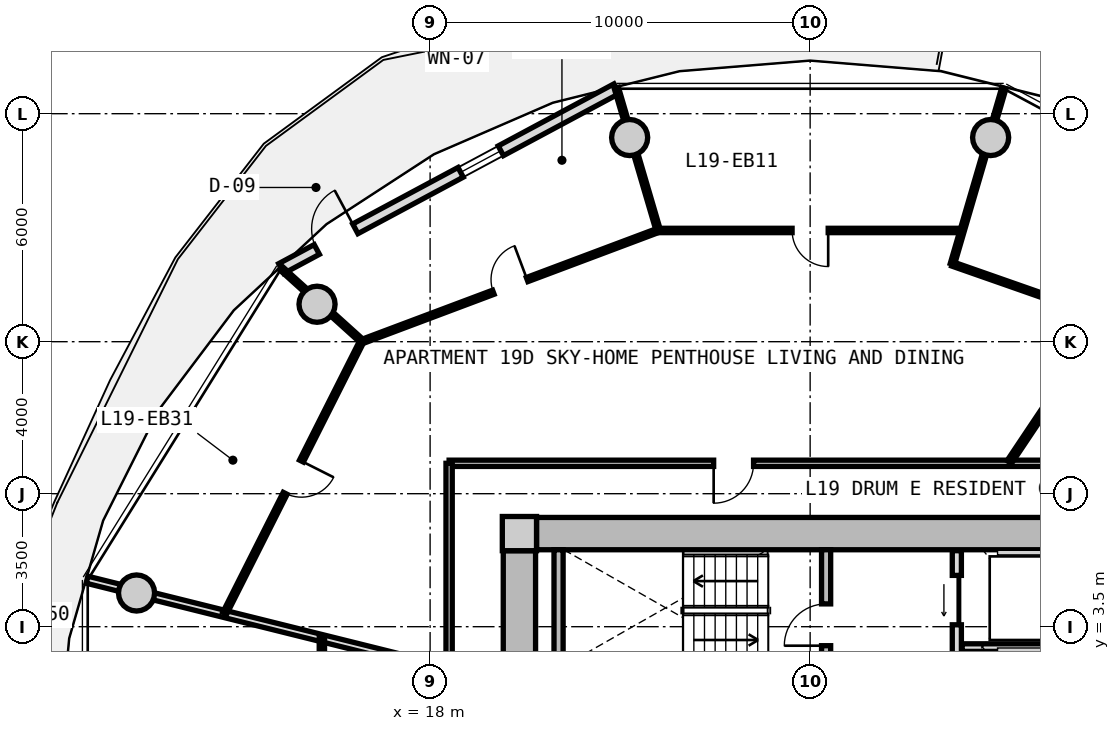
"""IFC4 building model, lengths in metres.
Left out: names, types, materials, properties, quantities, classifications, styles, units other than length and angle.
Written with IfcOpenShell. Run it as: python <this file> out.ifc"""

import sys

from ifc_helpers import new_model, si_unit, direction, frame, frame_2d, origin, origin_2d, place, context, subcontext, project, spatial, rectangle, circle, extrude, source, transform, mapped, element, fill, save


model = new_model("IFC4")
c1 = context("Model", 3, precision=1e-05, world=origin(), true_north=direction((0.0, 1.0)))
c2 = subcontext(c1, "Body", "Model", "MODEL_VIEW")
j1 = project(units=[si_unit("LENGTHUNIT", "METRE"), si_unit("PLANEANGLEUNIT", "RADIAN")], contexts=[c1])
p1 = place(None, origin())
s1 = spatial("IfcSite", under=j1, at=p1, CompositionType="ELEMENT")
p2 = place(p1, origin())
s2 = spatial("IfcBuilding", under=s1, at=p2, CompositionType="ELEMENT")
p3 = place(p2, frame((0.0, 0.0, 64.3)))
s3 = spatial("IfcBuildingStorey", under=s2, at=p3, CompositionType="ELEMENT", Elevation=64.3)
m1 = source(origin(), c2, "Body", "SweptSolid", [
    extrude(rectangle(XDim=0.9, YDim=0.9, at=origin_2d()), origin(), (0.0, 0.0, 1.0), 3.05),
])
p4 = place(p3, frame((20.35, 5.95, 0.0), z_axis=(0.0, 0.0, 1.0), x_axis=(1.0, 0.0, 0.0)))
e1 = element("IfcColumn", 1, at=p4, inside=s3, PredefinedType="COLUMN", context=c2, shape_type="MappedRepresentation", body=[
    mapped(m1, transform((0.0, 0.0, 0.0), x_axis=(1.0, 0.0, 0.0), y_axis=(0.0, 1.0, 0.0), z_axis=(0.0, 0.0, 1.0), scale=1.0)),
])
m2 = source(origin(), c2, "Body", "SweptSolid", [
    extrude(rectangle(XDim=14.4, YDim=0.85, at=frame_2d((7.2, 0.0))), origin(), (0.0, 0.0, 1.0), 2.79),
])
p5 = place(p3, frame((20.8, 5.95, 0.0), z_axis=(0.0, 0.0, 1.0), x_axis=(1.0, 0.0, 0.0)))
e2 = element("IfcWall", 2, at=p5, inside=s3, PredefinedType="SHEAR", context=c2, shape_type="MappedRepresentation", body=[
    mapped(m2, transform((0.0, 0.0, 0.0), x_axis=(1.0, 0.0, 0.0), y_axis=(0.0, 1.0, 0.0), z_axis=(0.0, 0.0, 1.0), scale=1.0)),
])
m3 = source(origin(), c2, "Body", "SweptSolid", [
    extrude(rectangle(XDim=11.0, YDim=0.85, at=frame_2d((5.5, 0.0))), origin(), (0.0, 0.0, 1.0), 2.79),
])
p6 = place(p3, frame((20.35, -5.5, 0.0), z_axis=(0.0, 0.0, 1.0), x_axis=(0.0, 1.0, 0.0)))
e3 = element("IfcWall", 3, at=p6, inside=s3, PredefinedType="SHEAR", context=c2, shape_type="MappedRepresentation", body=[
    mapped(m3, transform((0.0, 0.0, 0.0), x_axis=(1.0, 0.0, 0.0), y_axis=(0.0, 1.0, 0.0), z_axis=(0.0, 0.0, 1.0), scale=1.0)),
])
p7 = place(p6, frame((3.8, 0.0, 0.0)))
e4 = element("IfcOpeningElement", 4, at=p7, cuts=e3, PredefinedType="OPENING", context=c2, shape_type="SweptSolid", body=[
    extrude(rectangle(XDim=1.2, YDim=2.15, at=frame_2d((0.6, 1.075))), frame((0.0, 0.435, 0.0), z_axis=(0.0, -1.0, 0.0), x_axis=(1.0, 0.0, 0.0)), (0.0, 0.0, 1.0), 0.87),
])
m4 = source(origin(), c2, "Body", "SweptSolid", [
    extrude(circle(Radius=0.475, at=origin_2d()), origin(), (0.0, 0.0, 1.0), 3.05),
])
for number, where, z_axis, x_axis in (
    (5, (32.749, 16.373, 0.0), (0.0, 0.0, 1.0), (1.0, 0.0, 0.0)),
    (6, (23.251, 16.373, 0.0), (0.0, 0.0, 1.0), (1.0, 0.0, 0.0)),
    (7, (15.025, 11.985, 0.0), (0.0, 0.0, 1.0), (1.0, 0.0, 0.0)),
    (8, (10.275, 4.387, 0.0), (0.0, 0.0, 1.0), (1.0, 0.0, 0.0)),
):
    element("IfcColumn", number, at=place(p3, frame(where, z_axis=z_axis, x_axis=x_axis)), inside=s3, PredefinedType="COLUMN", context=c2, shape_type="MappedRepresentation", body=[
        mapped(m4, transform((0.0, 0.0, 0.0), x_axis=(1.0, 0.0, 0.0), y_axis=(0.0, 1.0, 0.0), z_axis=(0.0, 0.0, 1.0), scale=1.0)),
    ])
m5 = source(origin(), c2, "Body", "SweptSolid", [
    extrude(rectangle(XDim=10.011, YDim=0.29, at=frame_2d((5.005, 0.0))), origin(), (0.0, 0.0, 1.0), 2.79),
])
p8 = place(p3, frame((14.084, 12.926, 0.0), z_axis=(0.0, 0.0, 1.0), x_axis=(0.881272505317, 0.472608475773, 0.0)))
e9 = element("IfcWall", 9, at=p8, inside=s3, PredefinedType="SOLIDWALL", context=c2, shape_type="MappedRepresentation", body=[
    mapped(m5, transform((0.0, 0.0, 0.0), x_axis=(1.0, 0.0, 0.0), y_axis=(0.0, 1.0, 0.0), z_axis=(0.0, 0.0, 1.0), scale=1.0)),
])
p9 = place(p8, frame((1.06, 0.0, 0.0)))
e10 = element("IfcOpeningElement", 10, at=p9, cuts=e9, PredefinedType="OPENING", context=c2, shape_type="SweptSolid", body=[
    extrude(rectangle(XDim=1.15, YDim=2.25, at=frame_2d((0.575, 1.125))), frame((0.0, 0.155, 0.0), z_axis=(0.0, -1.0, 0.0), x_axis=(1.0, 0.0, 0.0)), (0.0, 0.0, 1.0), 0.31),
])
p10 = place(p8, frame((5.355, 0.0, 0.85)))
e11 = element("IfcOpeningElement", 11, at=p10, cuts=e9, PredefinedType="OPENING", context=c2, shape_type="SweptSolid", body=[
    extrude(rectangle(XDim=1.2, YDim=1.5, at=frame_2d((0.6, 0.75))), frame((0.0, 0.155, 0.0), z_axis=(0.0, -1.0, 0.0), x_axis=(1.0, 0.0, 0.0)), (0.0, 0.0, 1.0), 0.31),
])
m6 = source(origin(), c2, "Body", "SweptSolid", [
    extrude(rectangle(XDim=3.075, YDim=0.24, at=frame_2d((1.538, 0.0))), origin(), (0.0, 0.0, 1.0), 2.79),
])
p11 = place(p3, frame((21.38, 2.45, 0.0), z_axis=(0.0, 0.0, 1.0), x_axis=(0.0, 1.0, 0.0)))
e12 = element("IfcWall", 12, at=p11, inside=s3, PredefinedType="PARTITIONING", context=c2, shape_type="MappedRepresentation", body=[
    mapped(m6, transform((0.0, 0.0, 0.0), x_axis=(1.0, 0.0, 0.0), y_axis=(0.0, 1.0, 0.0), z_axis=(0.0, 0.0, 1.0), scale=1.0)),
])
p12 = place(p3, frame((28.42, 2.45, 0.0), z_axis=(0.0, 0.0, 1.0), x_axis=(0.0, 1.0, 0.0)))
e13 = element("IfcWall", 13, at=p12, inside=s3, PredefinedType="PARTITIONING", context=c2, shape_type="MappedRepresentation", body=[
    mapped(m6, transform((0.0, 0.0, 0.0), x_axis=(1.0, 0.0, 0.0), y_axis=(0.0, 1.0, 0.0), z_axis=(0.0, 0.0, 1.0), scale=1.0)),
])
p13 = place(p12, frame((0.55, 0.0, 0.0)))
e14 = element("IfcOpeningElement", 14, at=p13, cuts=e13, PredefinedType="OPENING", context=c2, shape_type="SweptSolid", body=[
    extrude(rectangle(XDim=1.1, YDim=2.15, at=frame_2d((0.55, 1.075))), frame((0.0, 0.13, 0.0), z_axis=(0.0, -1.0, 0.0), x_axis=(1.0, 0.0, 0.0)), (0.0, 0.0, 1.0), 0.26),
])
m7 = source(origin(), c2, "Body", "SweptSolid", [
    extrude(rectangle(XDim=5.0, YDim=0.24, at=frame_2d((2.5, 0.0))), origin(), (0.0, 0.0, 1.0), 2.775),
])
p14 = place(p3, frame((31.86, 0.5, 0.0), z_axis=(0.0, 0.0, 1.0), x_axis=(0.0, 1.0, 0.0)))
e15 = element("IfcWall", 15, at=p14, inside=s3, PredefinedType="PARTITIONING", context=c2, shape_type="MappedRepresentation", body=[
    mapped(m7, transform((0.0, 0.0, 0.0), x_axis=(1.0, 0.0, 0.0), y_axis=(0.0, 1.0, 0.0), z_axis=(0.0, 0.0, 1.0), scale=1.0)),
])
p15 = place(p14, frame((3.05, 0.0, 0.0)))
e16 = element("IfcOpeningElement", 16, at=p15, cuts=e15, PredefinedType="OPENING", context=c2, shape_type="SweptSolid", body=[
    extrude(rectangle(XDim=1.3, YDim=2.2, at=frame_2d((0.65, 1.1))), frame((0.0, 0.13, 0.0), z_axis=(0.0, -1.0, 0.0), x_axis=(1.0, 0.0, 0.0)), (0.0, 0.0, 1.0), 0.26),
])
p16 = place(p14, frame((0.55, 0.0, 0.0)))
e17 = element("IfcOpeningElement", 17, at=p16, cuts=e15, PredefinedType="OPENING", context=c2, shape_type="SweptSolid", body=[
    extrude(rectangle(XDim=1.3, YDim=2.2, at=frame_2d((0.65, 1.1))), frame((0.0, 0.13, 0.0), z_axis=(0.0, -1.0, 0.0), x_axis=(1.0, 0.0, 0.0)), (0.0, 0.0, 1.0), 0.26),
])
m8 = source(origin(), c2, "Body", "SweptSolid", [
    extrude(rectangle(XDim=3.2, YDim=0.2, at=frame_2d((1.6, 0.0))), origin(), (0.0, 0.0, 1.0), 2.775),
])
p17 = place(p3, frame((32.0, 2.95, 0.0), z_axis=(0.0, 0.0, 1.0), x_axis=(1.0, 0.0, 0.0)))
e18 = element("IfcWall", 18, at=p17, inside=s3, PredefinedType="PARTITIONING", context=c2, shape_type="MappedRepresentation", body=[
    mapped(m8, transform((0.0, 0.0, 0.0), x_axis=(1.0, 0.0, 0.0), y_axis=(0.0, 1.0, 0.0), z_axis=(0.0, 0.0, 1.0), scale=1.0)),
])
m9 = source(origin(), c2, "Body", "SweptSolid", [
    extrude(rectangle(XDim=19.0, YDim=0.165, at=frame_2d((9.5, 0.0))), origin(), (0.0, 0.0, 1.0), 2.775),
])
p18 = place(p3, frame((18.5, 7.8, 0.0), z_axis=(0.0, 0.0, 1.0), x_axis=(1.0, 0.0, 0.0)))
e19 = element("IfcWall", 19, at=p18, inside=s3, PredefinedType="PARTITIONING", context=c2, shape_type="MappedRepresentation", body=[
    mapped(m9, transform((0.0, 0.0, 0.0), x_axis=(1.0, 0.0, 0.0), y_axis=(0.0, 1.0, 0.0), z_axis=(0.0, 0.0, 1.0), scale=1.0)),
])
p19 = place(p18, frame((6.961, 0.0, 0.0)))
e20 = element("IfcOpeningElement", 20, at=p19, cuts=e19, PredefinedType="OPENING", context=c2, shape_type="SweptSolid", body=[
    extrude(rectangle(XDim=1.05, YDim=2.15, at=frame_2d((0.525, 1.075))), frame((0.0, 0.093, 0.0), z_axis=(0.0, -1.0, 0.0), x_axis=(1.0, 0.0, 0.0)), (0.0, 0.0, 1.0), 0.185),
])
m10 = source(origin(), c2, "Body", "SweptSolid", [
    extrude(rectangle(XDim=15.6, YDim=0.165, at=frame_2d((7.8, 0.0))), origin(), (0.0, 0.0, 1.0), 2.775),
])
p20 = place(p3, frame((18.5, -7.8, 0.0), z_axis=(0.0, 0.0, 1.0), x_axis=(0.0, 1.0, 0.0)))
e21 = element("IfcWall", 21, at=p20, inside=s3, PredefinedType="PARTITIONING", context=c2, shape_type="MappedRepresentation", body=[
    mapped(m10, transform((0.0, 0.0, 0.0), x_axis=(1.0, 0.0, 0.0), y_axis=(0.0, 1.0, 0.0), z_axis=(0.0, 0.0, 1.0), scale=1.0)),
])
p21 = place(p20, frame((3.63, 0.0, 0.0)))
e22 = element("IfcOpeningElement", 22, at=p21, cuts=e21, PredefinedType="OPENING", context=c2, shape_type="SweptSolid", body=[
    extrude(rectangle(XDim=1.05, YDim=2.15, at=frame_2d((0.525, 1.075))), frame((0.0, 0.093, 0.0), z_axis=(0.0, -1.0, 0.0), x_axis=(1.0, 0.0, 0.0)), (0.0, 0.0, 1.0), 0.185),
])
m11 = source(origin(), c2, "Body", "SweptSolid", [
    extrude(rectangle(XDim=9.737, YDim=0.19, at=frame_2d((4.869, 0.0))), origin(), (0.0, 0.0, 1.0), 2.225),
])
p22 = place(p3, frame((18.42, 2.385, 0.0), z_axis=(0.0, 0.0, 1.0), x_axis=(-0.970392716238, 0.241532557375, 0.0)))
e23 = element("IfcWall", 23, at=p22, inside=s3, PredefinedType="PARTITIONING", context=c2, shape_type="MappedRepresentation", body=[
    mapped(m11, transform((0.0, 0.0, 0.0), x_axis=(1.0, 0.0, 0.0), y_axis=(0.0, 1.0, 0.0), z_axis=(0.0, 0.0, 1.0), scale=1.0)),
])
m12 = source(origin(), c2, "Body", "SweptSolid", [
    extrude(rectangle(XDim=2.795, YDim=0.14, at=frame_2d((1.397, 0.0))), origin(), (0.0, 0.0, 1.0), 2.775),
])
p23 = place(p3, frame((15.148, 0.419, 0.0), z_axis=(0.0, 0.0, 1.0), x_axis=(0.001659531299, 0.999998622977, 0.0)))
e24 = element("IfcWall", 24, at=p23, inside=s3, PredefinedType="PARTITIONING", context=c2, shape_type="MappedRepresentation", body=[
    mapped(m12, transform((0.0, 0.0, 0.0), x_axis=(1.0, 0.0, 0.0), y_axis=(0.0, 1.0, 0.0), z_axis=(0.0, 0.0, 1.0), scale=1.0)),
])
m13 = source(origin(), c2, "Body", "SweptSolid", [
    extrude(rectangle(XDim=7.993, YDim=0.115, at=frame_2d((3.996, 0.0))), origin(), (0.0, 0.0, 1.0), 2.775),
])
p24 = place(p3, frame((31.996, 13.927, 0.0), z_axis=(0.0, 0.0, 1.0), x_axis=(-1.0, 0.0, 0.0)))
e25 = element("IfcWall", 25, at=p24, inside=s3, PredefinedType="PARTITIONING", context=c2, shape_type="MappedRepresentation", body=[
    mapped(m13, transform((0.0, 0.0, 0.0), x_axis=(1.0, 0.0, 0.0), y_axis=(0.0, 1.0, 0.0), z_axis=(0.0, 0.0, 1.0), scale=1.0)),
])
p25 = place(p24, frame((3.521, 0.0, 0.0)))
e26 = element("IfcOpeningElement", 26, at=p25, cuts=e25, PredefinedType="OPENING", context=c2, shape_type="SweptSolid", body=[
    extrude(rectangle(XDim=0.95, YDim=2.1, at=frame_2d((0.475, 1.05))), frame((0.0, 0.067, 0.0), z_axis=(0.0, -1.0, 0.0), x_axis=(1.0, 0.0, 0.0)), (0.0, 0.0, 1.0), 0.135),
])
m14 = source(origin(), c2, "Body", "SweptSolid", [
    extrude(rectangle(XDim=4.829, YDim=0.115, at=frame_2d((2.415, 0.0))), origin(), (0.0, 0.0, 1.0), 2.225),
])
p26 = place(p3, frame((31.742, 13.042, 0.0), z_axis=(0.0, 0.0, 1.0), x_axis=(0.280838556456, 0.959755023539, 0.0)))
e27 = element("IfcWall", 27, at=p26, inside=s3, PredefinedType="PARTITIONING", context=c2, shape_type="MappedRepresentation", body=[
    mapped(m14, transform((0.0, 0.0, 0.0), x_axis=(1.0, 0.0, 0.0), y_axis=(0.0, 1.0, 0.0), z_axis=(0.0, 0.0, 1.0), scale=1.0)),
])
m15 = source(origin(), c2, "Body", "SweptSolid", [
    extrude(rectangle(XDim=8.32, YDim=0.115, at=frame_2d((4.16, 0.0))), origin(), (0.0, 0.0, 1.0), 2.775),
])
p27 = place(p3, frame((24.003, 13.93, 0.0), z_axis=(0.0, 0.0, 1.0), x_axis=(-0.936180763098, -0.351518959382, 0.0)))
e28 = element("IfcWall", 28, at=p27, inside=s3, PredefinedType="PARTITIONING", context=c2, shape_type="MappedRepresentation", body=[
    mapped(m15, transform((0.0, 0.0, 0.0), x_axis=(1.0, 0.0, 0.0), y_axis=(0.0, 1.0, 0.0), z_axis=(0.0, 0.0, 1.0), scale=1.0)),
])
p28 = place(p27, frame((3.685, 0.0, 0.0)))
e29 = element("IfcOpeningElement", 29, at=p28, cuts=e28, PredefinedType="OPENING", context=c2, shape_type="SweptSolid", body=[
    extrude(rectangle(XDim=0.95, YDim=2.1, at=frame_2d((0.475, 1.05))), frame((0.0, 0.067, 0.0), z_axis=(0.0, -1.0, 0.0), x_axis=(1.0, 0.0, 0.0)), (0.0, 0.0, 1.0), 0.135),
])
m16 = source(origin(), c2, "Body", "SweptSolid", [
    extrude(rectangle(XDim=3.905, YDim=0.115, at=frame_2d((1.952, 0.0))), origin(), (0.0, 0.0, 1.0), 2.225),
])
p29 = place(p3, frame((24.003, 13.93, 0.0), z_axis=(0.0, 0.0, 1.0), x_axis=(-0.282037692958, 0.959403324859, 0.0)))
e30 = element("IfcWall", 30, at=p29, inside=s3, PredefinedType="PARTITIONING", context=c2, shape_type="MappedRepresentation", body=[
    mapped(m16, transform((0.0, 0.0, 0.0), x_axis=(1.0, 0.0, 0.0), y_axis=(0.0, 1.0, 0.0), z_axis=(0.0, 0.0, 1.0), scale=1.0)),
])
m17 = source(origin(), c2, "Body", "SweptSolid", [
    extrude(rectangle(XDim=8.018, YDim=0.115, at=frame_2d((4.009, 0.0))), origin(), (0.0, 0.0, 1.0), 2.775),
])
p30 = place(p3, frame((16.205, 11.014, 0.0), z_axis=(0.0, 0.0, 1.0), x_axis=(-0.450134355233, -0.89296084026, 0.0)))
e31 = element("IfcWall", 31, at=p30, inside=s3, PredefinedType="PARTITIONING", context=c2, shape_type="MappedRepresentation", body=[
    mapped(m17, transform((0.0, 0.0, 0.0), x_axis=(1.0, 0.0, 0.0), y_axis=(0.0, 1.0, 0.0), z_axis=(0.0, 0.0, 1.0), scale=1.0)),
])
p31 = place(p30, frame((3.534, 0.0, 0.0)))
e32 = element("IfcOpeningElement", 32, at=p31, cuts=e31, PredefinedType="OPENING", context=c2, shape_type="SweptSolid", body=[
    extrude(rectangle(XDim=0.95, YDim=2.1, at=frame_2d((0.475, 1.05))), frame((0.0, 0.067, 0.0), z_axis=(0.0, -1.0, 0.0), x_axis=(1.0, 0.0, 0.0)), (0.0, 0.0, 1.0), 0.135),
])
m18 = source(origin(), c2, "Body", "SweptSolid", [
    extrude(rectangle(XDim=2.875, YDim=0.115, at=frame_2d((1.438, 0.0))), origin(), (0.0, 0.0, 1.0), 2.225),
])
p32 = place(p3, frame((16.205, 11.014, 0.0), z_axis=(0.0, 0.0, 1.0), x_axis=(-0.742512588127, 0.669832110661, 0.0)))
e33 = element("IfcWall", 33, at=p32, inside=s3, PredefinedType="PARTITIONING", context=c2, shape_type="MappedRepresentation", body=[
    mapped(m18, transform((0.0, 0.0, 0.0), x_axis=(1.0, 0.0, 0.0), y_axis=(0.0, 1.0, 0.0), z_axis=(0.0, 0.0, 1.0), scale=1.0)),
])
m19 = source(origin(), c2, "Body", "SweptSolid", [
    extrude(rectangle(XDim=3.025, YDim=0.14, at=frame_2d((1.513, 0.0))), origin(), (0.0, 0.0, 1.0), 2.775),
])
p33 = place(p3, frame((33.24, 7.83, 0.0), z_axis=(0.0, 0.0, 1.0), x_axis=(0.556189165904, 0.831055721195, 0.0)))
e34 = element("IfcWall", 34, at=p33, inside=s3, PredefinedType="PARTITIONING", context=c2, shape_type="MappedRepresentation", body=[
    mapped(m19, transform((0.0, 0.0, 0.0), x_axis=(1.0, 0.0, 0.0), y_axis=(0.0, 1.0, 0.0), z_axis=(0.0, 0.0, 1.0), scale=1.0)),
])
m20 = source(origin(), c2, "Body", "SweptSolid", [
    extrude(rectangle(XDim=3.765, YDim=0.115, at=frame_2d((1.882, 0.0))), origin(), (0.0, 0.0, 1.0), 2.775),
])
p34 = place(p3, frame((35.296, 11.801, 0.0), z_axis=(0.0, 0.0, 1.0), x_axis=(-0.943788572669, 0.330549739222, 0.0)))
e35 = element("IfcWall", 35, at=p34, inside=s3, PredefinedType="PARTITIONING", context=c2, shape_type="MappedRepresentation", body=[
    mapped(m20, transform((0.0, 0.0, 0.0), x_axis=(1.0, 0.0, 0.0), y_axis=(0.0, 1.0, 0.0), z_axis=(0.0, 0.0, 1.0), scale=1.0)),
])
m21 = source(origin(), c2, "Body", "SweptSolid", [
    extrude(rectangle(XDim=1.15, YDim=2.25, at=frame_2d((0.575, 1.125))), frame((0.0, 0.025, 0.0), z_axis=(0.0, -1.0, 0.0), x_axis=(1.0, 0.0, 0.0)), (0.0, 0.0, 1.0), 0.05),
])
p35 = place(p9, origin())
e36 = element("IfcDoor", 36, at=p35, inside=s3, OperationType="SINGLE_SWING_RIGHT", PredefinedType="DOOR", context=c2, shape_type="MappedRepresentation", body=[
    mapped(m21, transform((0.0, 0.0, 0.0), x_axis=(1.0, 0.0, 0.0), y_axis=(0.0, 1.0, 0.0), z_axis=(0.0, 0.0, 1.0), scale=1.0)),
])
fill(e10, e36)
m22 = source(origin(), c2, "Body", "SweptSolid", [
    extrude(rectangle(XDim=1.2, YDim=1.5, at=frame_2d((0.6, 0.75))), frame((0.0, 0.03, 0.0), z_axis=(0.0, -1.0, 0.0), x_axis=(1.0, 0.0, 0.0)), (0.0, 0.0, 1.0), 0.06),
])
p36 = place(p10, origin())
e37 = element("IfcWindow", 37, at=p36, inside=s3, PartitioningType="SINGLE_PANEL", PredefinedType="WINDOW", context=c2, shape_type="MappedRepresentation", body=[
    mapped(m22, transform((0.0, 0.0, 0.0), x_axis=(1.0, 0.0, 0.0), y_axis=(0.0, 1.0, 0.0), z_axis=(0.0, 0.0, 1.0), scale=1.0)),
])
fill(e11, e37)
m23 = source(origin(), c2, "Body", "SweptSolid", [
    extrude(rectangle(XDim=1.1, YDim=2.15, at=frame_2d((0.55, 1.075))), frame((0.0, 0.025, 0.0), z_axis=(0.0, -1.0, 0.0), x_axis=(1.0, 0.0, 0.0)), (0.0, 0.0, 1.0), 0.05),
])
p37 = place(p13, origin())
e38 = element("IfcDoor", 38, at=p37, inside=s3, OperationType="SINGLE_SWING_LEFT", PredefinedType="DOOR", context=c2, shape_type="MappedRepresentation", body=[
    mapped(m23, transform((0.0, 0.0, 0.0), x_axis=(1.0, 0.0, 0.0), y_axis=(0.0, 1.0, 0.0), z_axis=(0.0, 0.0, 1.0), scale=1.0)),
])
fill(e14, e38)
m24 = source(origin(), c2, "Body", "SweptSolid", [
    extrude(rectangle(XDim=1.3, YDim=2.2, at=frame_2d((0.65, 1.1))), frame((0.0, 0.025, 0.0), z_axis=(0.0, -1.0, 0.0), x_axis=(1.0, 0.0, 0.0)), (0.0, 0.0, 1.0), 0.05),
])
p38 = place(p15, origin())
e39 = element("IfcDoor", 39, at=p38, inside=s3, OperationType="SLIDING_TO_LEFT", PredefinedType="DOOR", context=c2, shape_type="MappedRepresentation", body=[
    mapped(m24, transform((0.0, 0.0, 0.0), x_axis=(1.0, 0.0, 0.0), y_axis=(0.0, 1.0, 0.0), z_axis=(0.0, 0.0, 1.0), scale=1.0)),
])
fill(e16, e39)
m25 = source(origin(), c2, "Body", "SweptSolid", [
    extrude(rectangle(XDim=1.05, YDim=2.15, at=frame_2d((0.525, 1.075))), frame((0.0, 0.025, 0.0), z_axis=(0.0, -1.0, 0.0), x_axis=(1.0, 0.0, 0.0)), (0.0, 0.0, 1.0), 0.05),
])
p39 = place(p19, frame((1.05, 0.0, 0.0), z_axis=(0.0, 0.0, 1.0), x_axis=(-1.0, 0.0, 0.0)))
e40 = element("IfcDoor", 40, at=p39, inside=s3, OperationType="SINGLE_SWING_RIGHT", PredefinedType="DOOR", context=c2, shape_type="MappedRepresentation", body=[
    mapped(m25, transform((0.0, 0.0, 0.0), x_axis=(1.0, 0.0, 0.0), y_axis=(0.0, 1.0, 0.0), z_axis=(0.0, 0.0, 1.0), scale=1.0)),
])
fill(e20, e40)
m26 = source(origin(), c2, "Body", "SweptSolid", [
    extrude(rectangle(XDim=0.95, YDim=2.1, at=frame_2d((0.475, 1.05))), frame((0.0, 0.025, 0.0), z_axis=(0.0, -1.0, 0.0), x_axis=(1.0, 0.0, 0.0)), (0.0, 0.0, 1.0), 0.05),
])
p40 = place(p25, origin())
e41 = element("IfcDoor", 41, at=p40, inside=s3, OperationType="SINGLE_SWING_LEFT", PredefinedType="DOOR", context=c2, shape_type="MappedRepresentation", body=[
    mapped(m26, transform((0.0, 0.0, 0.0), x_axis=(1.0, 0.0, 0.0), y_axis=(0.0, 1.0, 0.0), z_axis=(0.0, 0.0, 1.0), scale=1.0)),
])
fill(e26, e41)
p41 = place(p28, frame((0.95, 0.0, 0.0), z_axis=(0.0, 0.0, 1.0), x_axis=(-1.0, 0.0, 0.0)))
e42 = element("IfcDoor", 42, at=p41, inside=s3, OperationType="SINGLE_SWING_RIGHT", PredefinedType="DOOR", context=c2, shape_type="MappedRepresentation", body=[
    mapped(m26, transform((0.0, 0.0, 0.0), x_axis=(1.0, 0.0, 0.0), y_axis=(0.0, 1.0, 0.0), z_axis=(0.0, 0.0, 1.0), scale=1.0)),
])
fill(e29, e42)
p42 = place(p31, origin())
e43 = element("IfcDoor", 43, at=p42, inside=s3, OperationType="SINGLE_SWING_LEFT", PredefinedType="DOOR", context=c2, shape_type="MappedRepresentation", body=[
    mapped(m26, transform((0.0, 0.0, 0.0), x_axis=(1.0, 0.0, 0.0), y_axis=(0.0, 1.0, 0.0), z_axis=(0.0, 0.0, 1.0), scale=1.0)),
])
fill(e32, e43)
save(model, sys.argv[1])
